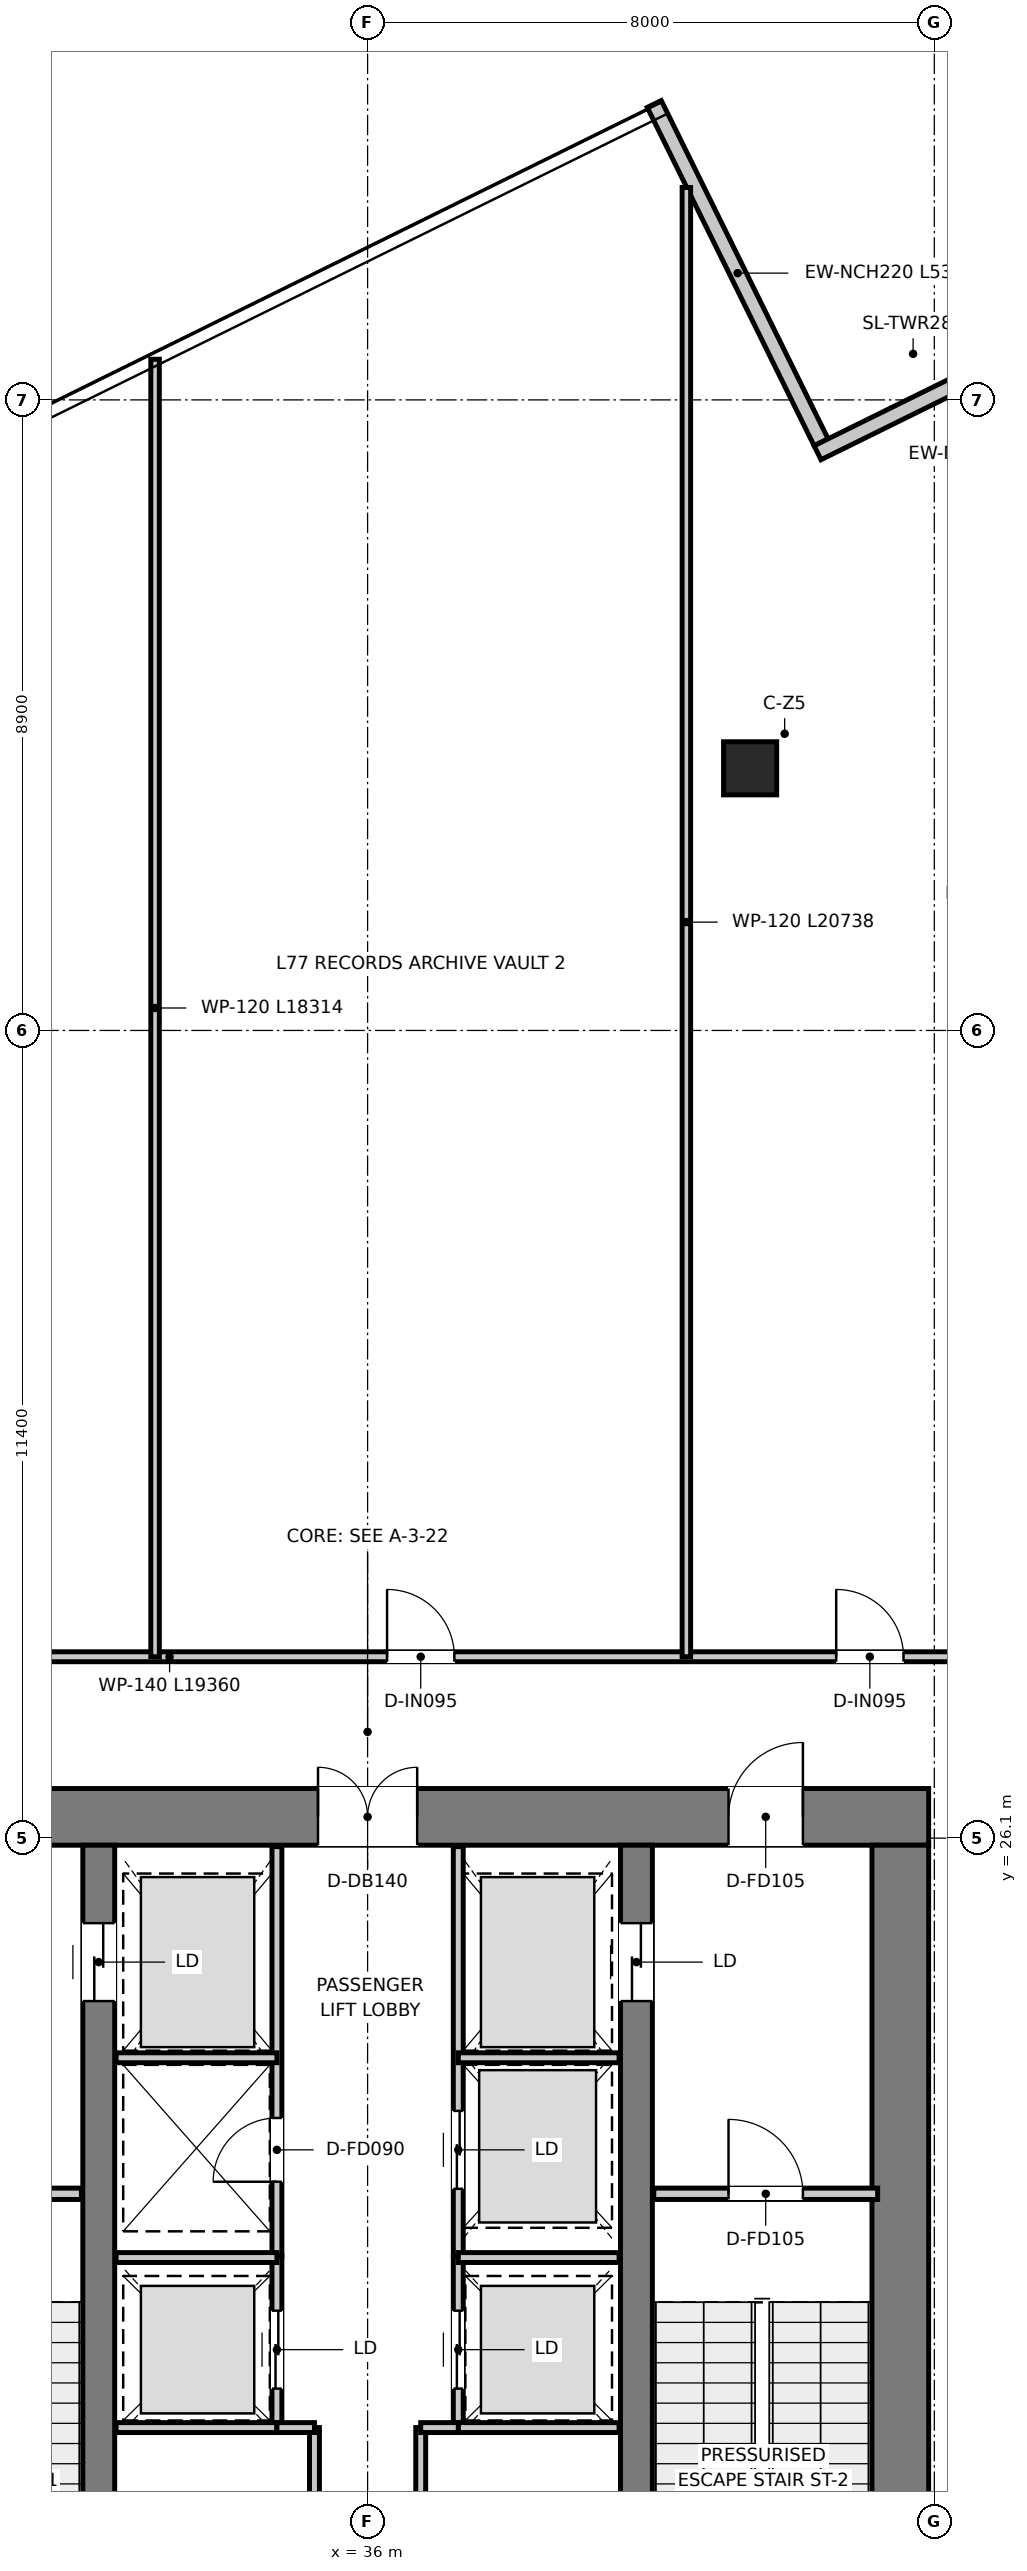
"""IFC4 building model, lengths in metres.
Left out: names, types, materials, properties, quantities, classifications, styles, units other than length and angle.
Written with IfcOpenShell. Run it as: python <this file> out.ifc"""

import sys

from ifc_helpers import new_model, si_unit, direction, frame, frame_2d, origin, origin_2d, place, context, subcontext, project, spatial, rectangle, extrude, source, transform, mapped, element, fill, save


model = new_model("IFC4")
c1 = context("Model", 3, precision=1e-05, world=origin(), true_north=direction((0.0, 1.0)))
c2 = subcontext(c1, "Body", "Model", "MODEL_VIEW")
j1 = project(units=[si_unit("LENGTHUNIT", "METRE"), si_unit("PLANEANGLEUNIT", "RADIAN")], contexts=[c1])
p1 = place(None, origin())
s1 = spatial("IfcSite", under=j1, at=p1, CompositionType="ELEMENT")
p2 = place(p1, origin())
s2 = spatial("IfcBuilding", under=s1, at=p2, CompositionType="ELEMENT")
p3 = place(p2, frame((0.0, 0.0, 314.8)))
s3 = spatial("IfcBuildingStorey", under=s2, at=p3, CompositionType="ELEMENT", Elevation=314.8)
p4 = place(p3, frame((28.08, 26.4, 0.0), z_axis=(0.0, 0.0, 1.0), x_axis=(1.0, 0.0, 0.0)))
e1 = element("IfcWall", 1, at=p4, inside=s3, PredefinedType="SHEAR", context=c2, shape_type="SweptSolid", body=[
    extrude(rectangle(XDim=15.84, YDim=0.8, at=frame_2d((7.92, 0.0))), origin(), (0.0, 0.0, 1.0), 3.95),
])
p5 = place(p4, frame((7.22, 0.0, 0.0)))
e2 = element("IfcOpeningElement", 2, at=p5, cuts=e1, PredefinedType="OPENING", context=c2, shape_type="SweptSolid", body=[
    extrude(rectangle(XDim=1.4, YDim=2.2, at=frame_2d((0.7, 1.1))), frame((0.0, 0.41, 0.0), z_axis=(0.0, -1.0, 0.0), x_axis=(1.0, 0.0, 0.0)), (0.0, 0.0, 1.0), 0.82),
])
p6 = place(p4, frame((1.775, 0.0, 0.0)))
e3 = element("IfcOpeningElement", 3, at=p6, cuts=e1, PredefinedType="OPENING", context=c2, shape_type="SweptSolid", body=[
    extrude(rectangle(XDim=1.05, YDim=2.1, at=frame_2d((0.525, 1.05))), frame((0.0, 0.41, 0.0), z_axis=(0.0, -1.0, 0.0), x_axis=(1.0, 0.0, 0.0)), (0.0, 0.0, 1.0), 0.82),
])
p7 = place(p4, frame((13.015, 0.0, 0.0)))
e4 = element("IfcOpeningElement", 4, at=p7, cuts=e1, PredefinedType="OPENING", context=c2, shape_type="SweptSolid", body=[
    extrude(rectangle(XDim=1.05, YDim=2.1, at=frame_2d((0.525, 1.05))), frame((0.0, 0.41, 0.0), z_axis=(0.0, -1.0, 0.0), x_axis=(1.0, 0.0, 0.0)), (0.0, 0.0, 1.0), 0.82),
])
p8 = place(p3, frame((43.52, 11.3, 0.0), z_axis=(0.0, 0.0, 1.0), x_axis=(0.0, 1.0, 0.0)))
e5 = element("IfcWall", 5, at=p8, inside=s3, PredefinedType="SHEAR", context=c2, shape_type="SweptSolid", body=[
    extrude(rectangle(XDim=14.7, YDim=0.8, at=frame_2d((7.35, 0.0))), origin(), (0.0, 0.0, 1.0), 3.95),
])
p9 = place(p3, frame((32.205, 13.22, 0.0), z_axis=(0.0, 0.0, 1.0), x_axis=(0.0, 1.0, 0.0)))
e6 = element("IfcWall", 6, at=p9, inside=s3, PredefinedType="SHEAR", context=c2, shape_type="SweptSolid", body=[
    extrude(rectangle(XDim=12.78, YDim=0.45, at=frame_2d((6.39, 0.0))), origin(), (0.0, 0.0, 1.0), 3.95),
])
p10 = place(p9, frame((10.58, 0.0, 0.0)))
e7 = element("IfcOpeningElement", 7, at=p10, cuts=e6, PredefinedType="OPENING", context=c2, shape_type="SweptSolid", body=[
    extrude(rectangle(XDim=1.1, YDim=2.15, at=frame_2d((0.55, 1.075))), frame((0.0, 0.235, 0.0), z_axis=(0.0, -1.0, 0.0), x_axis=(1.0, 0.0, 0.0)), (0.0, 0.0, 1.0), 0.47),
])
p11 = place(p3, frame((39.795, 13.22, 0.0), z_axis=(0.0, 0.0, 1.0), x_axis=(0.0, 1.0, 0.0)))
e8 = element("IfcWall", 8, at=p11, inside=s3, PredefinedType="SHEAR", context=c2, shape_type="SweptSolid", body=[
    extrude(rectangle(XDim=12.78, YDim=0.45, at=frame_2d((6.39, 0.0))), origin(), (0.0, 0.0, 1.0), 3.95),
])
p12 = place(p11, frame((10.58, 0.0, 0.0)))
e9 = element("IfcOpeningElement", 9, at=p12, cuts=e8, PredefinedType="OPENING", context=c2, shape_type="SweptSolid", body=[
    extrude(rectangle(XDim=1.1, YDim=2.15, at=frame_2d((0.55, 1.075))), frame((0.0, 0.235, 0.0), z_axis=(0.0, -1.0, 0.0), x_axis=(1.0, 0.0, 0.0)), (0.0, 0.0, 1.0), 0.47),
])
m1 = source(origin(), c2, "Body", "SweptSolid", [
    extrude(rectangle(XDim=0.75, YDim=0.75, at=origin_2d()), origin(), (0.0, 0.0, 1.0), 3.95),
])
p13 = place(p3, frame((41.4, 41.2, 0.0), z_axis=(0.0, 0.0, 1.0), x_axis=(1.0, 0.0, 0.0)))
e10 = element("IfcColumn", 10, at=p13, inside=s3, PredefinedType="COLUMN", context=c2, shape_type="MappedRepresentation", body=[
    mapped(m1, transform((0.0, 0.0, 0.0), x_axis=(1.0, 0.0, 0.0), y_axis=(0.0, 1.0, 0.0), z_axis=(0.0, 0.0, 1.0), scale=1.0)),
])
p14 = place(p3, frame((42.402, 45.801, 0.0), z_axis=(0.0, 0.0, 1.0), x_axis=(-0.442291978932, 0.896871119712, 0.0)))
e11 = element("IfcWall", 11, at=p14, inside=s3, PredefinedType="ELEMENTEDWALL", context=c2, shape_type="SweptSolid", body=[
    extrude(rectangle(XDim=5.325, YDim=0.22, at=frame_2d((2.663, 0.0))), origin(), (0.0, 0.0, 1.0), 3.59),
])
p15 = place(p3, frame((47.325, 48.106, 0.0), z_axis=(0.0, 0.0, 1.0), x_axis=(-0.896879244314, -0.442275503639, 0.0)))
e12 = element("IfcWall", 12, at=p15, inside=s3, PredefinedType="ELEMENTEDWALL", context=c2, shape_type="SweptSolid", body=[
    extrude(rectangle(XDim=5.545, YDim=0.22, at=frame_2d((2.772, 0.0))), origin(), (0.0, 0.0, 1.0), 3.59),
])
p16 = place(p3, frame((28.8, 21.08, 0.0), z_axis=(0.0, 0.0, 1.0), x_axis=(1.0, 0.0, 0.0)))
e13 = element("IfcWall", 13, at=p16, inside=s3, PredefinedType="PARTITIONING", context=c2, shape_type="SweptSolid", body=[
    extrude(rectangle(XDim=3.16, YDim=0.16, at=frame_2d((1.58, 0.0))), origin(), (0.0, 0.0, 1.0), 3.59),
])
p17 = place(p16, frame((1.055, 0.0, 0.0)))
e14 = element("IfcOpeningElement", 14, at=p17, cuts=e13, PredefinedType="OPENING", context=c2, shape_type="SweptSolid", body=[
    extrude(rectangle(XDim=1.05, YDim=2.1, at=frame_2d((0.525, 1.05))), frame((0.0, 0.09, 0.0), z_axis=(0.0, -1.0, 0.0), x_axis=(1.0, 0.0, 0.0)), (0.0, 0.0, 1.0), 0.18),
])
p18 = place(p3, frame((40.04, 21.08, 0.0), z_axis=(0.0, 0.0, 1.0), x_axis=(1.0, 0.0, 0.0)))
e15 = element("IfcWall", 15, at=p18, inside=s3, PredefinedType="PARTITIONING", context=c2, shape_type="SweptSolid", body=[
    extrude(rectangle(XDim=3.16, YDim=0.16, at=frame_2d((1.58, 0.0))), origin(), (0.0, 0.0, 1.0), 3.59),
])
p19 = place(p18, frame((1.055, 0.0, 0.0)))
e16 = element("IfcOpeningElement", 16, at=p19, cuts=e15, PredefinedType="OPENING", context=c2, shape_type="SweptSolid", body=[
    extrude(rectangle(XDim=1.05, YDim=2.1, at=frame_2d((0.525, 1.05))), frame((0.0, 0.09, 0.0), z_axis=(0.0, -1.0, 0.0), x_axis=(1.0, 0.0, 0.0)), (0.0, 0.0, 1.0), 0.18),
])
p20 = place(p3, frame((34.72, 20.2, 0.0), z_axis=(0.0, 0.0, 1.0), x_axis=(0.0, 1.0, 0.0)))
e17 = element("IfcWall", 17, at=p20, inside=s3, PredefinedType="PARTITIONING", context=c2, shape_type="SweptSolid", body=[
    extrude(rectangle(XDim=5.78, YDim=0.14, at=frame_2d((2.89, 0.0))), origin(), (0.0, 0.0, 1.0), 2.74),
])
p21 = place(p20, frame((1.05, 0.0, 0.0)))
e18 = element("IfcOpeningElement", 18, at=p21, cuts=e17, PredefinedType="OPENING", context=c2, shape_type="SweptSolid", body=[
    extrude(rectangle(XDim=0.9, YDim=2.1, at=frame_2d((0.45, 1.05))), frame((0.0, 0.08, 0.0), z_axis=(0.0, -1.0, 0.0), x_axis=(1.0, 0.0, 0.0)), (0.0, 0.0, 1.0), 0.16),
])
p22 = place(p3, frame((37.28, 20.2, 0.0), z_axis=(0.0, 0.0, 1.0), x_axis=(0.0, 1.0, 0.0)))
e19 = element("IfcWall", 19, at=p22, inside=s3, PredefinedType="PARTITIONING", context=c2, shape_type="SweptSolid", body=[
    extrude(rectangle(XDim=5.78, YDim=0.14, at=frame_2d((2.89, 0.0))), origin(), (0.0, 0.0, 1.0), 2.74),
])
p23 = place(p22, frame((0.95, 0.0, 0.0)))
e20 = element("IfcOpeningElement", 20, at=p23, cuts=e19, PredefinedType="OPENING", context=c2, shape_type="SweptSolid", body=[
    extrude(rectangle(XDim=1.1, YDim=2.15, at=frame_2d((0.55, 1.075))), frame((0.0, 0.08, 0.0), z_axis=(0.0, -1.0, 0.0), x_axis=(1.0, 0.0, 0.0)), (0.0, 0.0, 1.0), 0.16),
])
for number, where, z_axis, x_axis in (
    (21, (32.45, 23.0, 0.0), (0.0, 0.0, 1.0), (1.0, 0.0, 0.0)),
    (22, (37.28, 23.0, 0.0), (0.0, 0.0, 1.0), (1.0, 0.0, 0.0)),
):
    element("IfcWall", number, at=place(p3, frame(where, z_axis=z_axis, x_axis=x_axis)), inside=s3, PredefinedType="PARTITIONING", context=c2, shape_type="SweptSolid", body=[
        extrude(rectangle(XDim=2.27, YDim=0.14, at=frame_2d((1.135, 0.0))), origin(), (0.0, 0.0, 1.0), 2.74),
    ])
p24 = place(p3, frame((34.72, 17.78, 0.0), z_axis=(0.0, 0.0, 1.0), x_axis=(0.0, 1.0, 0.0)))
e23 = element("IfcWall", 23, at=p24, inside=s3, PredefinedType="PARTITIONING", context=c2, shape_type="SweptSolid", body=[
    extrude(rectangle(XDim=2.42, YDim=0.14, at=frame_2d((1.21, 0.0))), origin(), (0.0, 0.0, 1.0), 3.59),
])
p25 = place(p24, frame((0.55, 0.0, 0.0)))
e24 = element("IfcOpeningElement", 24, at=p25, cuts=e23, PredefinedType="OPENING", context=c2, shape_type="SweptSolid", body=[
    extrude(rectangle(XDim=1.1, YDim=2.15, at=frame_2d((0.55, 1.075))), frame((0.0, 0.08, 0.0), z_axis=(0.0, -1.0, 0.0), x_axis=(1.0, 0.0, 0.0)), (0.0, 0.0, 1.0), 0.16),
])
p26 = place(p3, frame((37.28, 17.78, 0.0), z_axis=(0.0, 0.0, 1.0), x_axis=(0.0, 1.0, 0.0)))
e25 = element("IfcWall", 25, at=p26, inside=s3, PredefinedType="PARTITIONING", context=c2, shape_type="SweptSolid", body=[
    extrude(rectangle(XDim=2.42, YDim=0.14, at=frame_2d((1.21, 0.0))), origin(), (0.0, 0.0, 1.0), 3.59),
])
p27 = place(p26, frame((0.55, 0.0, 0.0)))
e26 = element("IfcOpeningElement", 26, at=p27, cuts=e25, PredefinedType="OPENING", context=c2, shape_type="SweptSolid", body=[
    extrude(rectangle(XDim=1.1, YDim=2.15, at=frame_2d((0.55, 1.075))), frame((0.0, 0.08, 0.0), z_axis=(0.0, -1.0, 0.0), x_axis=(1.0, 0.0, 0.0)), (0.0, 0.0, 1.0), 0.16),
])
for number, where, z_axis, x_axis in (
    (27, (32.45, 17.78, 0.0), (0.0, 0.0, 1.0), (1.0, 0.0, 0.0)),
    (28, (32.45, 20.18, 0.0), (0.0, 0.0, 1.0), (1.0, 0.0, 0.0)),
    (29, (37.28, 17.78, 0.0), (0.0, 0.0, 1.0), (1.0, 0.0, 0.0)),
    (30, (37.28, 20.18, 0.0), (0.0, 0.0, 1.0), (1.0, 0.0, 0.0)),
):
    element("IfcWall", number, at=place(p3, frame(where, z_axis=z_axis, x_axis=x_axis)), inside=s3, PredefinedType="PARTITIONING", context=c2, shape_type="SweptSolid", body=[
        extrude(rectangle(XDim=2.27, YDim=0.14, at=frame_2d((1.135, 0.0))), origin(), (0.0, 0.0, 1.0), 3.59),
    ])
p28 = place(p3, frame((35.25, 13.22, 0.0), z_axis=(0.0, 0.0, 1.0), x_axis=(0.0, 1.0, 0.0)))
e31 = element("IfcWall", 31, at=p28, inside=s3, PredefinedType="PARTITIONING", context=c2, shape_type="SweptSolid", body=[
    extrude(rectangle(XDim=4.56, YDim=0.14, at=frame_2d((2.28, 0.0))), origin(), (0.0, 0.0, 1.0), 3.59),
])
p29 = place(p28, frame((1.93, 0.0, 0.0)))
e32 = element("IfcOpeningElement", 32, at=p29, cuts=e31, PredefinedType="OPENING", context=c2, shape_type="SweptSolid", body=[
    extrude(rectangle(XDim=0.9, YDim=2.1, at=frame_2d((0.45, 1.05))), frame((0.0, 0.08, 0.0), z_axis=(0.0, -1.0, 0.0), x_axis=(1.0, 0.0, 0.0)), (0.0, 0.0, 1.0), 0.16),
])
p30 = place(p3, frame((34.72, 17.78, 0.0), z_axis=(0.0, 0.0, 1.0), x_axis=(1.0, 0.0, 0.0)))
e33 = element("IfcWall", 33, at=p30, inside=s3, PredefinedType="PARTITIONING", context=c2, shape_type="SweptSolid", body=[
    extrude(rectangle(XDim=0.53, YDim=0.14, at=frame_2d((0.265, 0.0))), origin(), (0.0, 0.0, 1.0), 3.59),
])
p31 = place(p3, frame((36.75, 13.22, 0.0), z_axis=(0.0, 0.0, 1.0), x_axis=(0.0, 1.0, 0.0)))
e34 = element("IfcWall", 34, at=p31, inside=s3, PredefinedType="PARTITIONING", context=c2, shape_type="SweptSolid", body=[
    extrude(rectangle(XDim=4.56, YDim=0.14, at=frame_2d((2.28, 0.0))), origin(), (0.0, 0.0, 1.0), 3.59),
])
p32 = place(p31, frame((1.93, 0.0, 0.0)))
e35 = element("IfcOpeningElement", 35, at=p32, cuts=e34, PredefinedType="OPENING", context=c2, shape_type="SweptSolid", body=[
    extrude(rectangle(XDim=0.9, YDim=2.1, at=frame_2d((0.45, 1.05))), frame((0.0, 0.08, 0.0), z_axis=(0.0, -1.0, 0.0), x_axis=(1.0, 0.0, 0.0)), (0.0, 0.0, 1.0), 0.16),
])
p33 = place(p3, frame((36.75, 17.78, 0.0), z_axis=(0.0, 0.0, 1.0), x_axis=(1.0, 0.0, 0.0)))
e36 = element("IfcWall", 36, at=p33, inside=s3, PredefinedType="PARTITIONING", context=c2, shape_type="SweptSolid", body=[
    extrude(rectangle(XDim=0.53, YDim=0.14, at=frame_2d((0.265, 0.0))), origin(), (0.0, 0.0, 1.0), 3.59),
])
p34 = place(p3, frame((26.32, 28.66, 0.0), z_axis=(0.0, 0.0, 1.0), x_axis=(1.0, 0.0, 0.0)))
e37 = element("IfcWall", 37, at=p34, inside=s3, PredefinedType="PARTITIONING", context=c2, shape_type="SweptSolid", body=[
    extrude(rectangle(XDim=19.36, YDim=0.14, at=frame_2d((9.68, 0.0))), origin(), (0.0, 0.0, 1.0), 3.1),
])
p35 = place(p34, frame((2.865, 0.0, 0.0)))
e38 = element("IfcOpeningElement", 38, at=p35, cuts=e37, PredefinedType="OPENING", context=c2, shape_type="SweptSolid", body=[
    extrude(rectangle(XDim=0.95, YDim=2.1, at=frame_2d((0.475, 1.05))), frame((0.0, 0.08, 0.0), z_axis=(0.0, -1.0, 0.0), x_axis=(1.0, 0.0, 0.0)), (0.0, 0.0, 1.0), 0.16),
])
p36 = place(p34, frame((9.955, 0.0, 0.0)))
e39 = element("IfcOpeningElement", 39, at=p36, cuts=e37, PredefinedType="OPENING", context=c2, shape_type="SweptSolid", body=[
    extrude(rectangle(XDim=0.95, YDim=2.1, at=frame_2d((0.475, 1.05))), frame((0.0, 0.08, 0.0), z_axis=(0.0, -1.0, 0.0), x_axis=(1.0, 0.0, 0.0)), (0.0, 0.0, 1.0), 0.16),
])
p37 = place(p34, frame((16.295, 0.0, 0.0)))
e40 = element("IfcOpeningElement", 40, at=p37, cuts=e37, PredefinedType="OPENING", context=c2, shape_type="SweptSolid", body=[
    extrude(rectangle(XDim=0.95, YDim=2.1, at=frame_2d((0.475, 1.05))), frame((0.0, 0.08, 0.0), z_axis=(0.0, -1.0, 0.0), x_axis=(1.0, 0.0, 0.0)), (0.0, 0.0, 1.0), 0.16),
])
p38 = place(p3, frame((33.0, 28.66, 0.0), z_axis=(0.0, 0.0, 1.0), x_axis=(0.0, 1.0, 0.0)))
e41 = element("IfcWall", 41, at=p38, inside=s3, PredefinedType="PARTITIONING", context=c2, shape_type="SweptSolid", body=[
    extrude(rectangle(XDim=18.314, YDim=0.12, at=frame_2d((9.157, 0.0))), origin(), (0.0, 0.0, 1.0), 3.05),
])
p39 = place(p3, frame((40.5, 28.66, 0.0), z_axis=(0.0, 0.0, 1.0), x_axis=(0.0, 1.0, 0.0)))
e42 = element("IfcWall", 42, at=p39, inside=s3, PredefinedType="PARTITIONING", context=c2, shape_type="SweptSolid", body=[
    extrude(rectangle(XDim=20.738, YDim=0.12, at=frame_2d((10.369, 0.0))), origin(), (0.0, 0.0, 1.0), 3.05),
])
p40 = place(p19, origin())
e43 = element("IfcDoor", 43, at=p40, inside=s3, OperationType="SINGLE_SWING_LEFT", PredefinedType="DOOR", context=c2, shape_type="SweptSolid", body=[
    extrude(rectangle(XDim=1.05, YDim=2.1, at=frame_2d((0.525, 1.05))), frame((0.0, 0.025, 0.0), z_axis=(0.0, -1.0, 0.0), x_axis=(1.0, 0.0, 0.0)), (0.0, 0.0, 1.0), 0.05),
])
fill(e16, e43)
p41 = place(p5, origin())
e44 = element("IfcDoor", 44, at=p41, inside=s3, OperationType="DOUBLE_DOOR_SINGLE_SWING", PredefinedType="DOOR", context=c2, shape_type="SweptSolid", body=[
    extrude(rectangle(XDim=1.4, YDim=2.2, at=frame_2d((0.7, 1.1))), frame((0.0, 0.025, 0.0), z_axis=(0.0, -1.0, 0.0), x_axis=(1.0, 0.0, 0.0)), (0.0, 0.0, 1.0), 0.05),
])
fill(e2, e44)
p42 = place(p7, origin())
e45 = element("IfcDoor", 45, at=p42, inside=s3, OperationType="SINGLE_SWING_RIGHT", PredefinedType="DOOR", context=c2, shape_type="SweptSolid", body=[
    extrude(rectangle(XDim=1.05, YDim=2.1, at=frame_2d((0.525, 1.05))), frame((0.0, 0.025, 0.0), z_axis=(0.0, -1.0, 0.0), x_axis=(1.0, 0.0, 0.0)), (0.0, 0.0, 1.0), 0.05),
])
fill(e4, e45)
p43 = place(p10, origin())
e46 = element("IfcDoor", 46, at=p43, inside=s3, OperationType="DOUBLE_DOOR_SLIDING", PredefinedType="DOOR", context=c2, shape_type="SweptSolid", body=[
    extrude(rectangle(XDim=1.1, YDim=2.15, at=frame_2d((0.55, 1.075))), frame((0.0, 0.025, 0.0), z_axis=(0.0, -1.0, 0.0), x_axis=(1.0, 0.0, 0.0)), (0.0, 0.0, 1.0), 0.05),
])
fill(e7, e46)
p44 = place(p12, origin())
e47 = element("IfcDoor", 47, at=p44, inside=s3, OperationType="DOUBLE_DOOR_SLIDING", PredefinedType="DOOR", context=c2, shape_type="SweptSolid", body=[
    extrude(rectangle(XDim=1.1, YDim=2.15, at=frame_2d((0.55, 1.075))), frame((0.0, 0.025, 0.0), z_axis=(0.0, -1.0, 0.0), x_axis=(1.0, 0.0, 0.0)), (0.0, 0.0, 1.0), 0.05),
])
fill(e9, e47)
p45 = place(p21, origin())
e48 = element("IfcDoor", 48, at=p45, inside=s3, OperationType="SINGLE_SWING_LEFT", PredefinedType="DOOR", context=c2, shape_type="SweptSolid", body=[
    extrude(rectangle(XDim=0.9, YDim=2.1, at=frame_2d((0.45, 1.05))), frame((0.0, 0.025, 0.0), z_axis=(0.0, -1.0, 0.0), x_axis=(1.0, 0.0, 0.0)), (0.0, 0.0, 1.0), 0.05),
])
fill(e18, e48)
p46 = place(p23, origin())
e49 = element("IfcDoor", 49, at=p46, inside=s3, OperationType="DOUBLE_DOOR_SLIDING", PredefinedType="DOOR", context=c2, shape_type="SweptSolid", body=[
    extrude(rectangle(XDim=1.1, YDim=2.15, at=frame_2d((0.55, 1.075))), frame((0.0, 0.025, 0.0), z_axis=(0.0, -1.0, 0.0), x_axis=(1.0, 0.0, 0.0)), (0.0, 0.0, 1.0), 0.05),
])
fill(e20, e49)
p47 = place(p25, origin())
e50 = element("IfcDoor", 50, at=p47, inside=s3, OperationType="DOUBLE_DOOR_SLIDING", PredefinedType="DOOR", context=c2, shape_type="SweptSolid", body=[
    extrude(rectangle(XDim=1.1, YDim=2.15, at=frame_2d((0.55, 1.075))), frame((0.0, 0.025, 0.0), z_axis=(0.0, -1.0, 0.0), x_axis=(1.0, 0.0, 0.0)), (0.0, 0.0, 1.0), 0.05),
])
fill(e24, e50)
p48 = place(p27, origin())
e51 = element("IfcDoor", 51, at=p48, inside=s3, OperationType="DOUBLE_DOOR_SLIDING", PredefinedType="DOOR", context=c2, shape_type="SweptSolid", body=[
    extrude(rectangle(XDim=1.1, YDim=2.15, at=frame_2d((0.55, 1.075))), frame((0.0, 0.025, 0.0), z_axis=(0.0, -1.0, 0.0), x_axis=(1.0, 0.0, 0.0)), (0.0, 0.0, 1.0), 0.05),
])
fill(e26, e51)
p49 = place(p36, origin())
e52 = element("IfcDoor", 52, at=p49, inside=s3, OperationType="SINGLE_SWING_LEFT", PredefinedType="DOOR", context=c2, shape_type="SweptSolid", body=[
    extrude(rectangle(XDim=0.95, YDim=2.1, at=frame_2d((0.475, 1.05))), frame((0.0, 0.025, 0.0), z_axis=(0.0, -1.0, 0.0), x_axis=(1.0, 0.0, 0.0)), (0.0, 0.0, 1.0), 0.05),
])
fill(e39, e52)
p50 = place(p37, origin())
e53 = element("IfcDoor", 53, at=p50, inside=s3, OperationType="SINGLE_SWING_LEFT", PredefinedType="DOOR", context=c2, shape_type="SweptSolid", body=[
    extrude(rectangle(XDim=0.95, YDim=2.1, at=frame_2d((0.475, 1.05))), frame((0.0, 0.025, 0.0), z_axis=(0.0, -1.0, 0.0), x_axis=(1.0, 0.0, 0.0)), (0.0, 0.0, 1.0), 0.05),
])
fill(e40, e53)
save(model, sys.argv[1])
